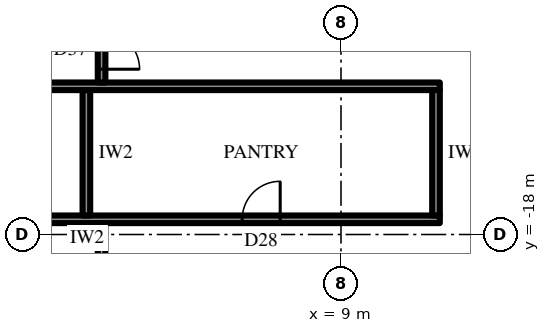
"""IFC4 building model, lengths in metres.
Left out: names, types, materials, properties, quantities, classifications, styles, units other than length and angle.
Written with IfcOpenShell. Run it as: python <this file> out.ifc"""

import sys

from ifc_helpers import new_model, si_unit, direction, frame, frame_2d, origin, place, context, subcontext, project, spatial, rectangle, extrude, element, fill, save


model = new_model("IFC4")
c1 = context("Model", 3, precision=1e-05, world=origin(), true_north=direction((0.0, 1.0)))
c2 = subcontext(c1, "Body", "Model", "MODEL_VIEW")
j1 = project(units=[si_unit("LENGTHUNIT", "METRE"), si_unit("PLANEANGLEUNIT", "RADIAN")], contexts=[c1])
p1 = place(None, origin())
s1 = spatial("IfcSite", under=j1, at=p1, CompositionType="ELEMENT")
p2 = place(p1, origin())
s2 = spatial("IfcBuilding", under=s1, at=p2, CompositionType="ELEMENT")
p3 = place(p2, frame((0.0, 0.0, 378.7)))
s3 = spatial("IfcBuildingStorey", under=s2, at=p3, CompositionType="ELEMENT", Elevation=378.7)
p4 = place(p3, frame((11.6, -14.1, 0.0), z_axis=(0.0, 0.0, 1.0), x_axis=(-1.0, 0.0, 0.0)))
e1 = element("IfcWall", 1, at=p4, inside=s3, PredefinedType="PARTITIONING", context=c2, shape_type="SweptSolid", body=[
    extrude(rectangle(XDim=23.2, YDim=0.2, at=frame_2d((11.6, 0.0))), origin(), (0.0, 0.0, 1.0), 4.0),
])
p5 = place(p3, frame((11.6, -17.6, 0.0), z_axis=(0.0, 0.0, 1.0), x_axis=(-1.0, 0.0, 0.0)))
e2 = element("IfcWall", 2, at=p5, inside=s3, PredefinedType="PARTITIONING", context=c2, shape_type="SweptSolid", body=[
    extrude(rectangle(XDim=23.2, YDim=0.2, at=frame_2d((11.6, 0.0))), origin(), (0.0, 0.0, 1.0), 4.0),
])
p6 = place(p5, frame((4.2, 0.0, 0.0)))
e3 = element("IfcOpeningElement", 3, at=p6, cuts=e2, PredefinedType="OPENING", context=c2, shape_type="SweptSolid", body=[
    extrude(rectangle(XDim=1.0, YDim=2.2, at=frame_2d((0.5, 1.1))), frame((0.0, 0.11, 0.0), z_axis=(0.0, -1.0, 0.0), x_axis=(1.0, 0.0, 0.0)), (0.0, 0.0, 1.0), 0.22),
])
p7 = place(p5, frame((12.25, 0.0, 0.0)))
e4 = element("IfcOpeningElement", 4, at=p7, cuts=e2, PredefinedType="OPENING", context=c2, shape_type="SweptSolid", body=[
    extrude(rectangle(XDim=1.0, YDim=2.2, at=frame_2d((0.5, 1.1))), frame((0.0, 0.11, 0.0), z_axis=(0.0, -1.0, 0.0), x_axis=(1.0, 0.0, 0.0)), (0.0, 0.0, 1.0), 0.22),
])
p8 = place(p5, frame((19.15, 0.0, 0.0)))
e5 = element("IfcOpeningElement", 5, at=p8, cuts=e2, PredefinedType="OPENING", context=c2, shape_type="SweptSolid", body=[
    extrude(rectangle(XDim=1.0, YDim=2.2, at=frame_2d((0.5, 1.1))), frame((0.0, 0.11, 0.0), z_axis=(0.0, -1.0, 0.0), x_axis=(1.0, 0.0, 0.0)), (0.0, 0.0, 1.0), 0.22),
])
for number, where, z_axis, x_axis in (
    (6, (11.5, -14.2, 0.0), (0.0, 0.0, 1.0), (0.0, -1.0, 0.0)),
    (7, (2.3, -14.2, 0.0), (0.0, 0.0, 1.0), (0.0, -1.0, 0.0)),
):
    element("IfcWall", number, at=place(p3, frame(where, z_axis=z_axis, x_axis=x_axis)), inside=s3, PredefinedType="PARTITIONING", context=c2, shape_type="SweptSolid", body=[
        extrude(rectangle(XDim=3.3, YDim=0.2, at=frame_2d((1.65, 0.0))), origin(), (0.0, 0.0, 1.0), 4.0),
    ])
p9 = place(p3, frame((2.7, -12.3, 0.0), z_axis=(0.0, 0.0, 1.0), x_axis=(0.0, -1.0, 0.0)))
e8 = element("IfcWall", 8, at=p9, inside=s3, PredefinedType="PARTITIONING", context=c2, shape_type="SweptSolid", body=[
    extrude(rectangle(XDim=1.7, YDim=0.2, at=frame_2d((0.85, 0.0))), origin(), (0.0, 0.0, 1.0), 4.0),
])
p10 = place(p9, frame((0.35, 0.0, 0.0)))
e9 = element("IfcOpeningElement", 9, at=p10, cuts=e8, PredefinedType="OPENING", context=c2, shape_type="SweptSolid", body=[
    extrude(rectangle(XDim=1.0, YDim=2.2, at=frame_2d((0.5, 1.1))), frame((0.0, 0.11, 0.0), z_axis=(0.0, -1.0, 0.0), x_axis=(1.0, 0.0, 0.0)), (0.0, 0.0, 1.0), 0.22),
])
p11 = place(p3, frame((2.7, -17.7, 0.0), z_axis=(0.0, 0.0, 1.0), x_axis=(0.0, -1.0, 0.0)))
e10 = element("IfcWall", 10, at=p11, inside=s3, PredefinedType="PARTITIONING", context=c2, shape_type="SweptSolid", body=[
    extrude(rectangle(XDim=8.85, YDim=0.2, at=frame_2d((4.425, 0.0))), origin(), (0.0, 0.0, 1.0), 4.0),
])
p12 = place(p6, frame((1.0, 0.0, 0.0), z_axis=(0.0, 0.0, 1.0), x_axis=(-1.0, 0.0, 0.0)))
e11 = element("IfcDoor", 11, at=p12, inside=s3, OperationType="SINGLE_SWING_LEFT", PredefinedType="DOOR", context=c2, shape_type="SweptSolid", body=[
    extrude(rectangle(XDim=1.0, YDim=2.2, at=frame_2d((0.5, 1.1))), frame((0.0, 0.025, 0.0), z_axis=(0.0, -1.0, 0.0), x_axis=(1.0, 0.0, 0.0)), (0.0, 0.0, 1.0), 0.05),
])
fill(e3, e11)
p13 = place(p10, origin())
e12 = element("IfcDoor", 12, at=p13, inside=s3, OperationType="SINGLE_SWING_LEFT", PredefinedType="DOOR", context=c2, shape_type="SweptSolid", body=[
    extrude(rectangle(XDim=1.0, YDim=2.2, at=frame_2d((0.5, 1.1))), frame((0.0, 0.025, 0.0), z_axis=(0.0, -1.0, 0.0), x_axis=(1.0, 0.0, 0.0)), (0.0, 0.0, 1.0), 0.05),
])
fill(e9, e12)
save(model, sys.argv[1])
